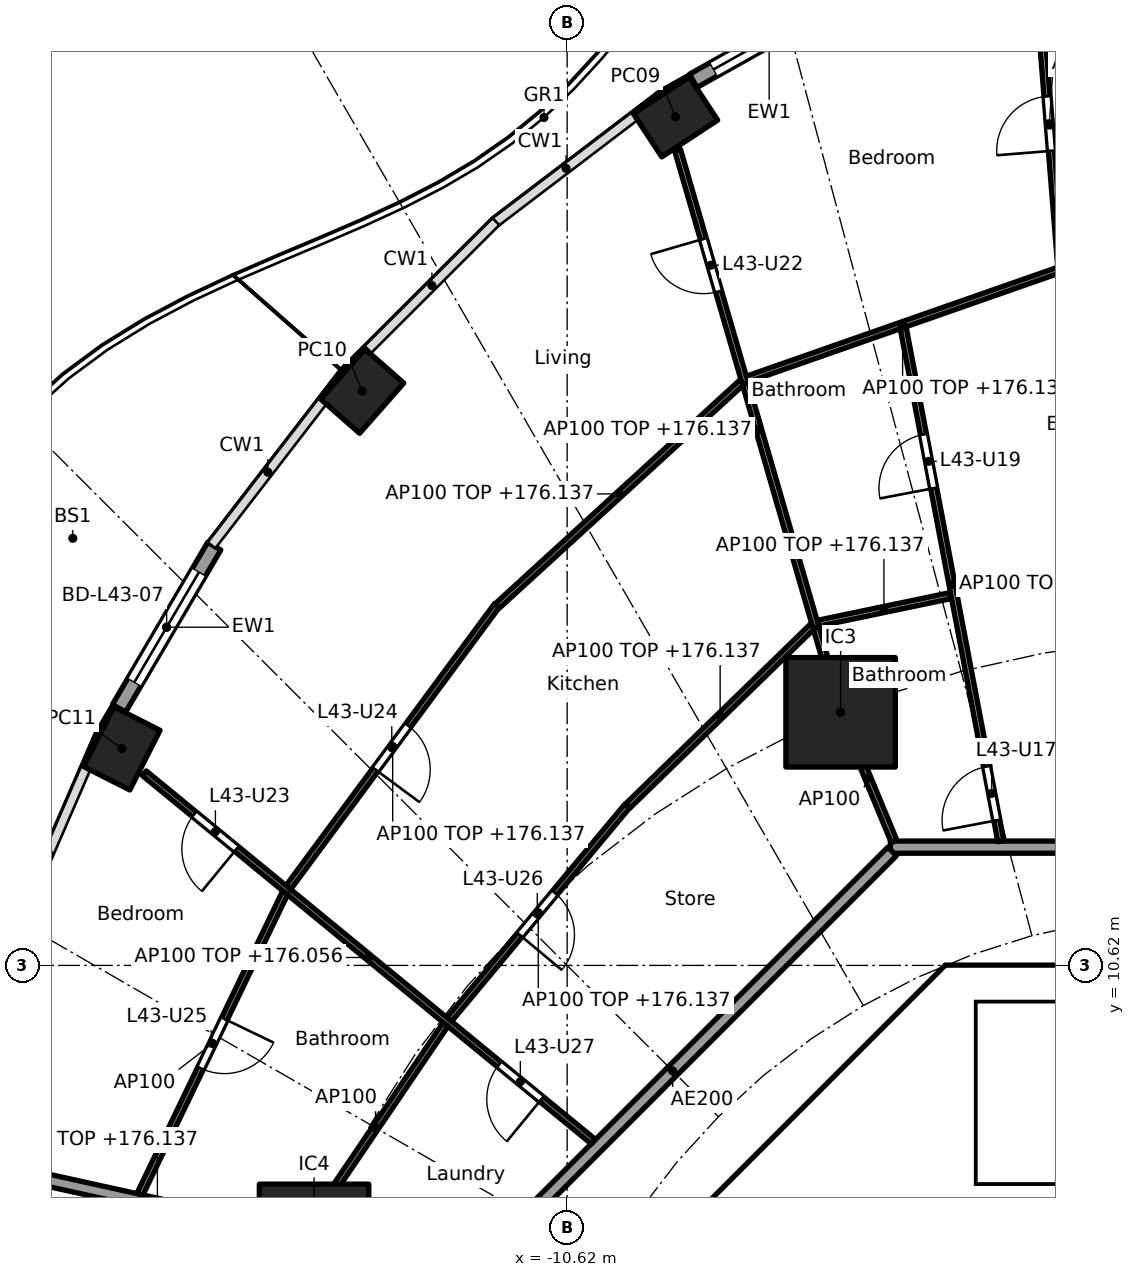
"""IFC4 building model, lengths in metres.
Left out: names, types, materials, properties, quantities, classifications, styles, units other than length and angle.
Written with IfcOpenShell. Run it as: python <this file> out.ifc"""

import sys

from ifc_helpers import new_model, si_unit, direction, frame, frame_2d, origin, origin_2d, place, context, subcontext, project, spatial, polyline, rectangle, hollow_rectangle, outline, extrude, element, fill, save


model = new_model("IFC4")
c1 = context("Model", 3, precision=1e-05, world=origin(), true_north=direction((0.0, 1.0)))
c2 = subcontext(c1, "Body", "Model", "MODEL_VIEW")
j1 = project(units=[si_unit("LENGTHUNIT", "METRE"), si_unit("PLANEANGLEUNIT", "RADIAN")], contexts=[c1])
p1 = place(None, origin())
s1 = spatial("IfcSite", under=j1, at=p1, CompositionType="ELEMENT")
p2 = place(p1, origin())
s2 = spatial("IfcBuilding", under=s1, at=p2, CompositionType="ELEMENT")
p3 = place(p2, frame((0.0, 0.0, 173.3)))
s3 = spatial("IfcBuildingStorey", under=s2, at=p3, CompositionType="ELEMENT", Elevation=173.3)
for number, where, z_axis, x_axis in (
    (1, (-8.837, 24.573, 0.0), (0.0, 0.0, 1.0), (-0.836, -0.549, 0.0)),
    (2, (-13.989, 20.064, 0.0), (0.0, 0.0, 1.0), (-0.66, -0.751, 0.0)),
    (3, (-17.942, 14.188, 0.0), (0.0, 0.0, 1.0), (-0.452, -0.892, 0.0)),
):
    element("IfcColumn", number, at=place(p3, frame(where, z_axis=z_axis, x_axis=x_axis)), inside=s3, PredefinedType="COLUMN", context=c2, shape_type="SweptSolid", body=[
        extrude(hollow_rectangle(XDim=1.1, YDim=0.85, WallThickness=0.036, at=origin_2d()), origin(), (0.0, 0.0, 1.0), 3.7),
    ])
for number, where, z_axis, x_axis in (
    (4, (-6.123, 14.782, 0.0), (0.0, 0.0, 1.0), (1.0, 0.0, 0.0)),
    (5, (-14.782, 6.123, 0.0), (0.0, 0.0, 1.0), (1.0, 0.0, 0.0)),
):
    element("IfcColumn", number, at=place(p3, frame(where, z_axis=z_axis, x_axis=x_axis)), inside=s3, PredefinedType="COLUMN", context=c2, shape_type="SweptSolid", body=[
        extrude(rectangle(XDim=1.8, YDim=1.8, at=origin_2d()), origin(), (0.0, 0.0, 1.0), 3.7),
    ])
p4 = place(p3, frame((-8.547, 25.167, 0.0), z_axis=(0.0, 0.0, 1.0), x_axis=(0.872078262455, 0.489366431371, 0.0)))
e6 = element("IfcWall", 6, at=p4, inside=s3, PredefinedType="SOLIDWALL", context=c2, shape_type="SweptSolid", body=[
    extrude(rectangle(XDim=2.864, YDim=0.25, at=frame_2d((1.432, 0.0))), origin(), (0.0, 0.0, 1.0), 3.44),
])
p5 = place(p4, frame((0.382, 0.0, 0.0)))
e7 = element("IfcOpeningElement", 7, at=p5, cuts=e6, PredefinedType="OPENING", context=c2, shape_type="SweptSolid", body=[
    extrude(rectangle(XDim=2.1, YDim=2.4, at=frame_2d((1.05, 1.2))), frame((0.0, 0.135, 0.0), z_axis=(0.0, -1.0, 0.0), x_axis=(1.0, 0.0, 0.0)), (0.0, 0.0, 1.0), 0.27),
])
p6 = place(p3, frame((-17.989, 14.848, 0.0), z_axis=(0.0, 0.0, 1.0), x_axis=(0.506309086483, 0.862352079458, 0.0)))
e8 = element("IfcWall", 8, at=p6, inside=s3, PredefinedType="SOLIDWALL", context=c2, shape_type="SweptSolid", body=[
    extrude(rectangle(XDim=3.092, YDim=0.25, at=frame_2d((1.546, 0.0))), origin(), (0.0, 0.0, 1.0), 3.44),
])
p7 = place(p6, frame((0.496, 0.0, 0.0)))
e9 = element("IfcOpeningElement", 9, at=p7, cuts=e8, PredefinedType="OPENING", context=c2, shape_type="SweptSolid", body=[
    extrude(rectangle(XDim=2.1, YDim=2.4, at=frame_2d((1.05, 1.2))), frame((0.0, 0.135, 0.0), z_axis=(0.0, -1.0, 0.0), x_axis=(1.0, 0.0, 0.0)), (0.0, 0.0, 1.0), 0.27),
])
p8 = place(p3, frame((-4.613, 9.988, 0.0), z_axis=(0.0, 0.0, 1.0), x_axis=(-0.707106781187, -0.707106781187, 0.0)))
e10 = element("IfcWall", 10, at=p8, inside=s3, PredefinedType="SHEAR", context=c2, shape_type="SweptSolid", body=[
    extrude(rectangle(XDim=7.602, YDim=0.6, at=frame_2d((3.801, 0.0))), origin(), (0.0, 0.0, 1.0), 3.44),
])
p9 = place(p8, frame((0.351, 0.0, 0.0)))
e11 = element("IfcOpeningElement", 11, at=p9, cuts=e10, PredefinedType="OPENING", context=c2, shape_type="SweptSolid", body=[
    extrude(rectangle(XDim=1.1, YDim=2.1, at=frame_2d((0.55, 1.05))), frame((0.0, 0.31, 0.0), z_axis=(0.0, -1.0, 0.0), x_axis=(1.0, 0.0, 0.0)), (0.0, 0.0, 1.0), 0.62),
])
p10 = place(p3, frame((-5.8, 4.3, 0.0), z_axis=(0.0, 0.0, 1.0), x_axis=(0.0, 1.0, 0.0)))
e12 = element("IfcWall", 12, at=p10, inside=s3, PredefinedType="PARTITIONING", context=c2, shape_type="SweptSolid", body=[
    extrude(rectangle(XDim=3.927, YDim=0.15, at=frame_2d((1.963, 0.0))), origin(), (0.0, 0.0, 1.0), 3.44),
])
p11 = place(p10, frame((0.413, 0.0, 0.0)))
e13 = element("IfcOpeningElement", 13, at=p11, cuts=e12, PredefinedType="OPENING", context=c2, shape_type="SweptSolid", body=[
    extrude(rectangle(XDim=0.9, YDim=2.1, at=frame_2d((0.45, 1.05))), frame((0.0, 0.085, 0.0), z_axis=(0.0, -1.0, 0.0), x_axis=(1.0, 0.0, 0.0)), (0.0, 0.0, 1.0), 0.17),
])
p12 = place(p10, frame((2.489, 0.0, 0.0)))
e14 = element("IfcOpeningElement", 14, at=p12, cuts=e12, PredefinedType="OPENING", context=c2, shape_type="SweptSolid", body=[
    extrude(rectangle(XDim=0.9, YDim=2.1, at=frame_2d((0.45, 1.05))), frame((0.0, 0.085, 0.0), z_axis=(0.0, -1.0, 0.0), x_axis=(1.0, 0.0, 0.0)), (0.0, 0.0, 1.0), 0.17),
])
p13 = place(p3, origin())
e15 = element("IfcWall", 15, at=p13, inside=s3, PredefinedType="SHEAR", context=c2, shape_type="SweptSolid", body=[
    extrude(outline(polyline([(-4.152, 10.025), (-4.401, 9.776), (-4.825, 10.2), (-4.401, 10.625), (4.401, 10.625), (4.825, 10.2), (4.401, 9.776), (4.152, 10.025), (-4.152, 10.025)])), origin(), (0.0, 0.0, 1.0), 3.44),
])
p14 = place(p3, origin())
e16 = element("IfcWall", 16, at=p14, inside=s3, PredefinedType="SOLIDWALL", context=c2, shape_type="SweptSolid", body=[
    extrude(outline(polyline([(-3.9, 7.025), (-4.1, 7.025), (-4.1, 10.025), (-3.9, 10.025), (-3.9, 7.025)])), origin(), (0.0, 0.0, 1.0), 3.44),
])
p15 = place(p3, origin())
e17 = element("IfcWall", 17, at=p15, inside=s3, PredefinedType="SOLIDWALL", context=c2, shape_type="SweptSolid", body=[
    extrude(outline(polyline([(4.1, 6.5), (-4.1, 6.5), (-4.1, 7.025), (4.1, 7.025), (4.1, 6.5)])), origin(), (0.0, 0.0, 1.0), 3.44),
])
p16 = place(p3, frame((-14.831, 6.134, 0.0), z_axis=(0.0, 0.0, 1.0), x_axis=(-0.976568396888, 0.215207263354, 0.0)))
e18 = element("IfcWall", 18, at=p16, inside=s3, PredefinedType="PARTITIONING", context=c2, shape_type="SweptSolid", body=[
    extrude(rectangle(XDim=5.177, YDim=0.2, at=frame_2d((2.588, 0.0))), origin(), (0.0, 0.0, 1.0), 2.837),
])
p17 = place(p3, frame((5.104, 12.565, 0.0), z_axis=(0.0, 0.0, 1.0), x_axis=(-1.0, 0.0, 0.0)))
e19 = element("IfcWall", 19, at=p17, inside=s3, PredefinedType="PARTITIONING", context=c2, shape_type="SweptSolid", body=[
    extrude(rectangle(XDim=10.409, YDim=0.2, at=frame_2d((5.205, 0.0))), origin(), (0.0, 0.0, 1.0), 3.44),
])
p18 = place(p17, frame((6.339, 0.0, 0.0)))
e20 = element("IfcOpeningElement", 20, at=p18, cuts=e19, PredefinedType="OPENING", context=c2, shape_type="SweptSolid", body=[
    extrude(rectangle(XDim=1.0, YDim=2.1, at=frame_2d((0.5, 1.05))), frame((0.0, 0.11, 0.0), z_axis=(0.0, -1.0, 0.0), x_axis=(1.0, 0.0, 0.0)), (0.0, 0.0, 1.0), 0.22),
])
p19 = place(p3, frame((-5.275, 12.494, 0.0), z_axis=(0.0, 0.0, 1.0), x_axis=(-0.707106781187, -0.707106781187, 0.0)))
e21 = element("IfcWall", 21, at=p19, inside=s3, PredefinedType="PARTITIONING", context=c2, shape_type="SweptSolid", body=[
    extrude(rectangle(XDim=10.209, YDim=0.2, at=frame_2d((5.104, 0.0))), origin(), (0.0, 0.0, 1.0), 3.44),
])
p20 = place(p3, frame((-2.495, 22.017, 0.0), z_axis=(0.0, 0.0, 1.0), x_axis=(-0.080150660566, 0.99678276049, 0.0)))
e22 = element("IfcWall", 22, at=p20, inside=s3, PredefinedType="PARTITIONING", context=c2, shape_type="SweptSolid", body=[
    extrude(rectangle(XDim=4.858, YDim=0.1, at=frame_2d((2.429, 0.0))), origin(), (0.0, 0.0, 1.0), 2.837),
])
p21 = place(p20, frame((2.004, 0.0, 0.0)))
e23 = element("IfcOpeningElement", 23, at=p21, cuts=e22, PredefinedType="OPENING", context=c2, shape_type="SweptSolid", body=[
    extrude(rectangle(XDim=0.9, YDim=2.1, at=frame_2d((0.45, 1.05))), frame((0.0, 0.06, 0.0), z_axis=(0.0, -1.0, 0.0), x_axis=(1.0, 0.0, 0.0)), (0.0, 0.0, 1.0), 0.12),
])
p22 = place(p3, frame((-2.546, 22.051, 0.0), z_axis=(0.0, 0.0, 1.0), x_axis=(-0.943911038661, -0.330199865375, 0.0)))
e24 = element("IfcWall", 24, at=p22, inside=s3, PredefinedType="PARTITIONING", context=c2, shape_type="SweptSolid", body=[
    extrude(rectangle(XDim=5.417, YDim=0.1, at=frame_2d((2.709, 0.0))), origin(), (0.0, 0.0, 1.0), 2.837),
])
p23 = place(p3, frame((-3.488, 12.663, 0.0), z_axis=(0.0, 0.0, 1.0), x_axis=(-0.186783185485, 0.982401161247, 0.0)))
e25 = element("IfcWall", 25, at=p23, inside=s3, PredefinedType="PARTITIONING", context=c2, shape_type="SweptSolid", body=[
    extrude(rectangle(XDim=8.595, YDim=0.1, at=frame_2d((4.298, 0.0))), origin(), (0.0, 0.0, 1.0), 2.756),
])
p24 = place(p23, frame((0.35, 0.0, 0.0)))
e26 = element("IfcOpeningElement", 26, at=p24, cuts=e25, PredefinedType="OPENING", context=c2, shape_type="SweptSolid", body=[
    extrude(rectangle(XDim=0.9, YDim=2.1, at=frame_2d((0.45, 1.05))), frame((0.0, 0.06, 0.0), z_axis=(0.0, -1.0, 0.0), x_axis=(1.0, 0.0, 0.0)), (0.0, 0.0, 1.0), 0.12),
])
p25 = place(p23, frame((5.908, 0.0, 0.0)))
e27 = element("IfcOpeningElement", 27, at=p25, cuts=e25, PredefinedType="OPENING", context=c2, shape_type="SweptSolid", body=[
    extrude(rectangle(XDim=0.9, YDim=2.1, at=frame_2d((0.45, 1.05))), frame((0.0, 0.06, 0.0), z_axis=(0.0, -1.0, 0.0), x_axis=(1.0, 0.0, 0.0)), (0.0, 0.0, 1.0), 0.12),
])
p26 = place(p3, frame((-4.324, 16.699, 0.0), z_axis=(0.0, 0.0, 1.0), x_axis=(-0.978908011866, -0.204301503432, 0.0)))
e28 = element("IfcWall", 28, at=p26, inside=s3, PredefinedType="PARTITIONING", context=c2, shape_type="SweptSolid", body=[
    extrude(rectangle(XDim=2.218, YDim=0.1, at=frame_2d((1.109, 0.0))), origin(), (0.0, 0.0, 1.0), 2.837),
])
p27 = place(p3, frame((-5.243, 12.657, 0.0), z_axis=(0.0, 0.0, 1.0), x_axis=(-0.382719158442, 0.923864733477, 0.0)))
e29 = element("IfcWall", 29, at=p27, inside=s3, PredefinedType="PARTITIONING", context=c2, shape_type="SweptSolid", body=[
    extrude(rectangle(XDim=2.25, YDim=0.1, at=frame_2d((1.125, 0.0))), origin(), (0.0, 0.0, 1.0), 3.44),
])
p28 = place(p3, frame((-6.137, 14.83, 0.0), z_axis=(0.0, 0.0, 1.0), x_axis=(-0.278461169897, 0.96044748782, 0.0)))
e30 = element("IfcWall", 30, at=p28, inside=s3, PredefinedType="PARTITIONING", context=c2, shape_type="SweptSolid", body=[
    extrude(rectangle(XDim=9.573, YDim=0.1, at=frame_2d((4.787, 0.0))), origin(), (0.0, 0.0, 1.0), 2.837),
])
p29 = place(p28, frame((7.156, 0.0, 0.0)))
e31 = element("IfcOpeningElement", 31, at=p29, cuts=e30, PredefinedType="OPENING", context=c2, shape_type="SweptSolid", body=[
    extrude(rectangle(XDim=0.9, YDim=2.1, at=frame_2d((0.45, 1.05))), frame((0.0, 0.06, 0.0), z_axis=(0.0, -1.0, 0.0), x_axis=(1.0, 0.0, 0.0)), (0.0, 0.0, 1.0), 0.12),
])
p30 = place(p3, frame((-6.58, 16.201, 0.0), z_axis=(0.0, 0.0, 1.0), x_axis=(-0.716946269374, -0.697128429223, 0.0)))
e32 = element("IfcWall", 32, at=p30, inside=s3, PredefinedType="PARTITIONING", context=c2, shape_type="SweptSolid", body=[
    extrude(rectangle(XDim=4.25, YDim=0.1, at=frame_2d((2.125, 0.0))), origin(), (0.0, 0.0, 1.0), 2.837),
])
p31 = place(p3, frame((-7.744, 20.212, 0.0), z_axis=(0.0, 0.0, 1.0), x_axis=(-0.738051761282, -0.674744097913, 0.0)))
e33 = element("IfcWall", 33, at=p31, inside=s3, PredefinedType="PARTITIONING", context=c2, shape_type="SweptSolid", body=[
    extrude(rectangle(XDim=5.449, YDim=0.1, at=frame_2d((2.725, 0.0))), origin(), (0.0, 0.0, 1.0), 2.837),
])
p32 = place(p3, frame((-9.631, 13.242, 0.0), z_axis=(0.0, 0.0, 1.0), x_axis=(-0.640315711982, -0.768111833647, 0.0)))
e34 = element("IfcWall", 34, at=p32, inside=s3, PredefinedType="PARTITIONING", context=c2, shape_type="SweptSolid", body=[
    extrude(rectangle(XDim=4.572, YDim=0.1, at=frame_2d((2.286, 0.0))), origin(), (0.0, 0.0, 1.0), 2.837),
])
p33 = place(p32, frame((1.861, 0.0, 0.0)))
e35 = element("IfcOpeningElement", 35, at=p33, cuts=e34, PredefinedType="OPENING", context=c2, shape_type="SweptSolid", body=[
    extrude(rectangle(XDim=0.9, YDim=2.1, at=frame_2d((0.45, 1.05))), frame((0.0, 0.06, 0.0), z_axis=(0.0, -1.0, 0.0), x_axis=(1.0, 0.0, 0.0)), (0.0, 0.0, 1.0), 0.12),
])
p34 = place(p3, frame((-11.773, 16.542, 0.0), z_axis=(0.0, 0.0, 1.0), x_axis=(-0.594694305999, -0.803951915485, 0.0)))
e36 = element("IfcWall", 36, at=p34, inside=s3, PredefinedType="PARTITIONING", context=c2, shape_type="SweptSolid", body=[
    extrude(rectangle(XDim=5.772, YDim=0.1, at=frame_2d((2.886, 0.0))), origin(), (0.0, 0.0, 1.0), 2.837),
])
p35 = place(p34, frame((2.461, 0.0, 0.0)))
e37 = element("IfcOpeningElement", 37, at=p35, cuts=e36, PredefinedType="OPENING", context=c2, shape_type="SweptSolid", body=[
    extrude(rectangle(XDim=0.9, YDim=2.1, at=frame_2d((0.45, 1.05))), frame((0.0, 0.06, 0.0), z_axis=(0.0, -1.0, 0.0), x_axis=(1.0, 0.0, 0.0)), (0.0, 0.0, 1.0), 0.12),
])
p36 = place(p3, frame((-10.189, 7.721, 0.0), z_axis=(0.0, 0.0, 1.0), x_axis=(-0.773134429339, 0.634242188892, 0.0)))
e38 = element("IfcWall", 38, at=p36, inside=s3, PredefinedType="PARTITIONING", context=c2, shape_type="SweptSolid", body=[
    extrude(rectangle(XDim=9.552, YDim=0.1, at=frame_2d((4.776, 0.0))), origin(), (0.0, 0.0, 1.0), 2.756),
])
p37 = place(p36, frame((7.59, 0.0, 0.0)))
e39 = element("IfcOpeningElement", 39, at=p37, cuts=e38, PredefinedType="OPENING", context=c2, shape_type="SweptSolid", body=[
    extrude(rectangle(XDim=0.9, YDim=2.1, at=frame_2d((0.45, 1.05))), frame((0.0, 0.06, 0.0), z_axis=(0.0, -1.0, 0.0), x_axis=(1.0, 0.0, 0.0)), (0.0, 0.0, 1.0), 0.12),
])
p38 = place(p36, frame((1.104, 0.0, 0.0)))
e40 = element("IfcOpeningElement", 40, at=p38, cuts=e38, PredefinedType="OPENING", context=c2, shape_type="SweptSolid", body=[
    extrude(rectangle(XDim=0.9, YDim=2.1, at=frame_2d((0.45, 1.05))), frame((0.0, 0.06, 0.0), z_axis=(0.0, -1.0, 0.0), x_axis=(1.0, 0.0, 0.0)), (0.0, 0.0, 1.0), 0.12),
])
p39 = place(p3, frame((-12.619, 9.65, 0.0), z_axis=(0.0, 0.0, 1.0), x_axis=(-0.561046521684, -0.82778427172, 0.0)))
e41 = element("IfcWall", 41, at=p39, inside=s3, PredefinedType="PARTITIONING", context=c2, shape_type="SweptSolid", body=[
    extrude(rectangle(XDim=4.109, YDim=0.1, at=frame_2d((2.054, 0.0))), origin(), (0.0, 0.0, 1.0), 3.44),
])
p40 = place(p3, frame((-15.257, 11.816, 0.0), z_axis=(0.0, 0.0, 1.0), x_axis=(-0.434027506504, -0.900899619046, 0.0)))
e42 = element("IfcWall", 42, at=p40, inside=s3, PredefinedType="PARTITIONING", context=c2, shape_type="SweptSolid", body=[
    extrude(rectangle(XDim=5.508, YDim=0.1, at=frame_2d((2.754, 0.0))), origin(), (0.0, 0.0, 1.0), 3.44),
])
p41 = place(p40, frame((2.304, 0.0, 0.0)))
e43 = element("IfcOpeningElement", 43, at=p41, cuts=e42, PredefinedType="OPENING", context=c2, shape_type="SweptSolid", body=[
    extrude(rectangle(XDim=0.9, YDim=2.1, at=frame_2d((0.45, 1.05))), frame((0.0, 0.06, 0.0), z_axis=(0.0, -1.0, 0.0), x_axis=(1.0, 0.0, 0.0)), (0.0, 0.0, 1.0), 0.12),
])
p42 = place(p5, origin())
e44 = element("IfcDoor", 44, at=p42, inside=s3, OperationType="SLIDING_TO_LEFT", PredefinedType="DOOR", context=c2, shape_type="SweptSolid", body=[
    extrude(rectangle(XDim=2.1, YDim=2.4, at=frame_2d((1.05, 1.2))), frame((0.0, 0.025, 0.0), z_axis=(0.0, -1.0, 0.0), x_axis=(1.0, 0.0, 0.0)), (0.0, 0.0, 1.0), 0.05),
])
fill(e7, e44)
p43 = place(p7, origin())
e45 = element("IfcDoor", 45, at=p43, inside=s3, OperationType="SLIDING_TO_LEFT", PredefinedType="DOOR", context=c2, shape_type="SweptSolid", body=[
    extrude(rectangle(XDim=2.1, YDim=2.4, at=frame_2d((1.05, 1.2))), frame((0.0, 0.025, 0.0), z_axis=(0.0, -1.0, 0.0), x_axis=(1.0, 0.0, 0.0)), (0.0, 0.0, 1.0), 0.05),
])
fill(e9, e45)
p44 = place(p12, origin())
e46 = element("IfcDoor", 46, at=p44, inside=s3, OperationType="SINGLE_SWING_LEFT", PredefinedType="DOOR", context=c2, shape_type="SweptSolid", body=[
    extrude(rectangle(XDim=0.9, YDim=2.1, at=frame_2d((0.45, 1.05))), frame((0.0, 0.025, 0.0), z_axis=(0.0, -1.0, 0.0), x_axis=(1.0, 0.0, 0.0)), (0.0, 0.0, 1.0), 0.05),
])
fill(e14, e46)
p45 = place(p9, origin())
e47 = element("IfcDoor", 47, at=p45, inside=s3, OperationType="SINGLE_SWING_RIGHT", PredefinedType="DOOR", context=c2, shape_type="SweptSolid", body=[
    extrude(rectangle(XDim=1.1, YDim=2.1, at=frame_2d((0.55, 1.05))), frame((0.0, 0.025, 0.0), z_axis=(0.0, -1.0, 0.0), x_axis=(1.0, 0.0, 0.0)), (0.0, 0.0, 1.0), 0.05),
])
fill(e11, e47)
p46 = place(p24, origin())
e48 = element("IfcDoor", 48, at=p46, inside=s3, OperationType="SINGLE_SWING_LEFT", PredefinedType="DOOR", context=c2, shape_type="SweptSolid", body=[
    extrude(rectangle(XDim=0.9, YDim=2.1, at=frame_2d((0.45, 1.05))), frame((0.0, 0.025, 0.0), z_axis=(0.0, -1.0, 0.0), x_axis=(1.0, 0.0, 0.0)), (0.0, 0.0, 1.0), 0.05),
])
fill(e26, e48)
p47 = place(p25, origin())
e49 = element("IfcDoor", 49, at=p47, inside=s3, OperationType="SINGLE_SWING_LEFT", PredefinedType="DOOR", context=c2, shape_type="SweptSolid", body=[
    extrude(rectangle(XDim=0.9, YDim=2.1, at=frame_2d((0.45, 1.05))), frame((0.0, 0.025, 0.0), z_axis=(0.0, -1.0, 0.0), x_axis=(1.0, 0.0, 0.0)), (0.0, 0.0, 1.0), 0.05),
])
fill(e27, e49)
p48 = place(p21, origin())
e50 = element("IfcDoor", 50, at=p48, inside=s3, OperationType="SINGLE_SWING_LEFT", PredefinedType="DOOR", context=c2, shape_type="SweptSolid", body=[
    extrude(rectangle(XDim=0.9, YDim=2.1, at=frame_2d((0.45, 1.05))), frame((0.0, 0.025, 0.0), z_axis=(0.0, -1.0, 0.0), x_axis=(1.0, 0.0, 0.0)), (0.0, 0.0, 1.0), 0.05),
])
fill(e23, e50)
p49 = place(p29, origin())
e51 = element("IfcDoor", 51, at=p49, inside=s3, OperationType="SINGLE_SWING_RIGHT", PredefinedType="DOOR", context=c2, shape_type="SweptSolid", body=[
    extrude(rectangle(XDim=0.9, YDim=2.1, at=frame_2d((0.45, 1.05))), frame((0.0, 0.025, 0.0), z_axis=(0.0, -1.0, 0.0), x_axis=(1.0, 0.0, 0.0)), (0.0, 0.0, 1.0), 0.05),
])
fill(e31, e51)
p50 = place(p37, origin())
e52 = element("IfcDoor", 52, at=p50, inside=s3, OperationType="SINGLE_SWING_LEFT", PredefinedType="DOOR", context=c2, shape_type="SweptSolid", body=[
    extrude(rectangle(XDim=0.9, YDim=2.1, at=frame_2d((0.45, 1.05))), frame((0.0, 0.025, 0.0), z_axis=(0.0, -1.0, 0.0), x_axis=(1.0, 0.0, 0.0)), (0.0, 0.0, 1.0), 0.05),
])
fill(e39, e52)
p51 = place(p35, origin())
e53 = element("IfcDoor", 53, at=p51, inside=s3, OperationType="SINGLE_SWING_RIGHT", PredefinedType="DOOR", context=c2, shape_type="SweptSolid", body=[
    extrude(rectangle(XDim=0.9, YDim=2.1, at=frame_2d((0.45, 1.05))), frame((0.0, 0.025, 0.0), z_axis=(0.0, -1.0, 0.0), x_axis=(1.0, 0.0, 0.0)), (0.0, 0.0, 1.0), 0.05),
])
fill(e37, e53)
p52 = place(p41, origin())
e54 = element("IfcDoor", 54, at=p52, inside=s3, OperationType="SINGLE_SWING_LEFT", PredefinedType="DOOR", context=c2, shape_type="SweptSolid", body=[
    extrude(rectangle(XDim=0.9, YDim=2.1, at=frame_2d((0.45, 1.05))), frame((0.0, 0.025, 0.0), z_axis=(0.0, -1.0, 0.0), x_axis=(1.0, 0.0, 0.0)), (0.0, 0.0, 1.0), 0.05),
])
fill(e43, e54)
p53 = place(p33, origin())
e55 = element("IfcDoor", 55, at=p53, inside=s3, OperationType="SINGLE_SWING_RIGHT", PredefinedType="DOOR", context=c2, shape_type="SweptSolid", body=[
    extrude(rectangle(XDim=0.9, YDim=2.1, at=frame_2d((0.45, 1.05))), frame((0.0, 0.025, 0.0), z_axis=(0.0, -1.0, 0.0), x_axis=(1.0, 0.0, 0.0)), (0.0, 0.0, 1.0), 0.05),
])
fill(e35, e55)
p54 = place(p38, origin())
e56 = element("IfcDoor", 56, at=p54, inside=s3, OperationType="SINGLE_SWING_LEFT", PredefinedType="DOOR", context=c2, shape_type="SweptSolid", body=[
    extrude(rectangle(XDim=0.9, YDim=2.1, at=frame_2d((0.45, 1.05))), frame((0.0, 0.025, 0.0), z_axis=(0.0, -1.0, 0.0), x_axis=(1.0, 0.0, 0.0)), (0.0, 0.0, 1.0), 0.05),
])
fill(e40, e56)
save(model, sys.argv[1])
